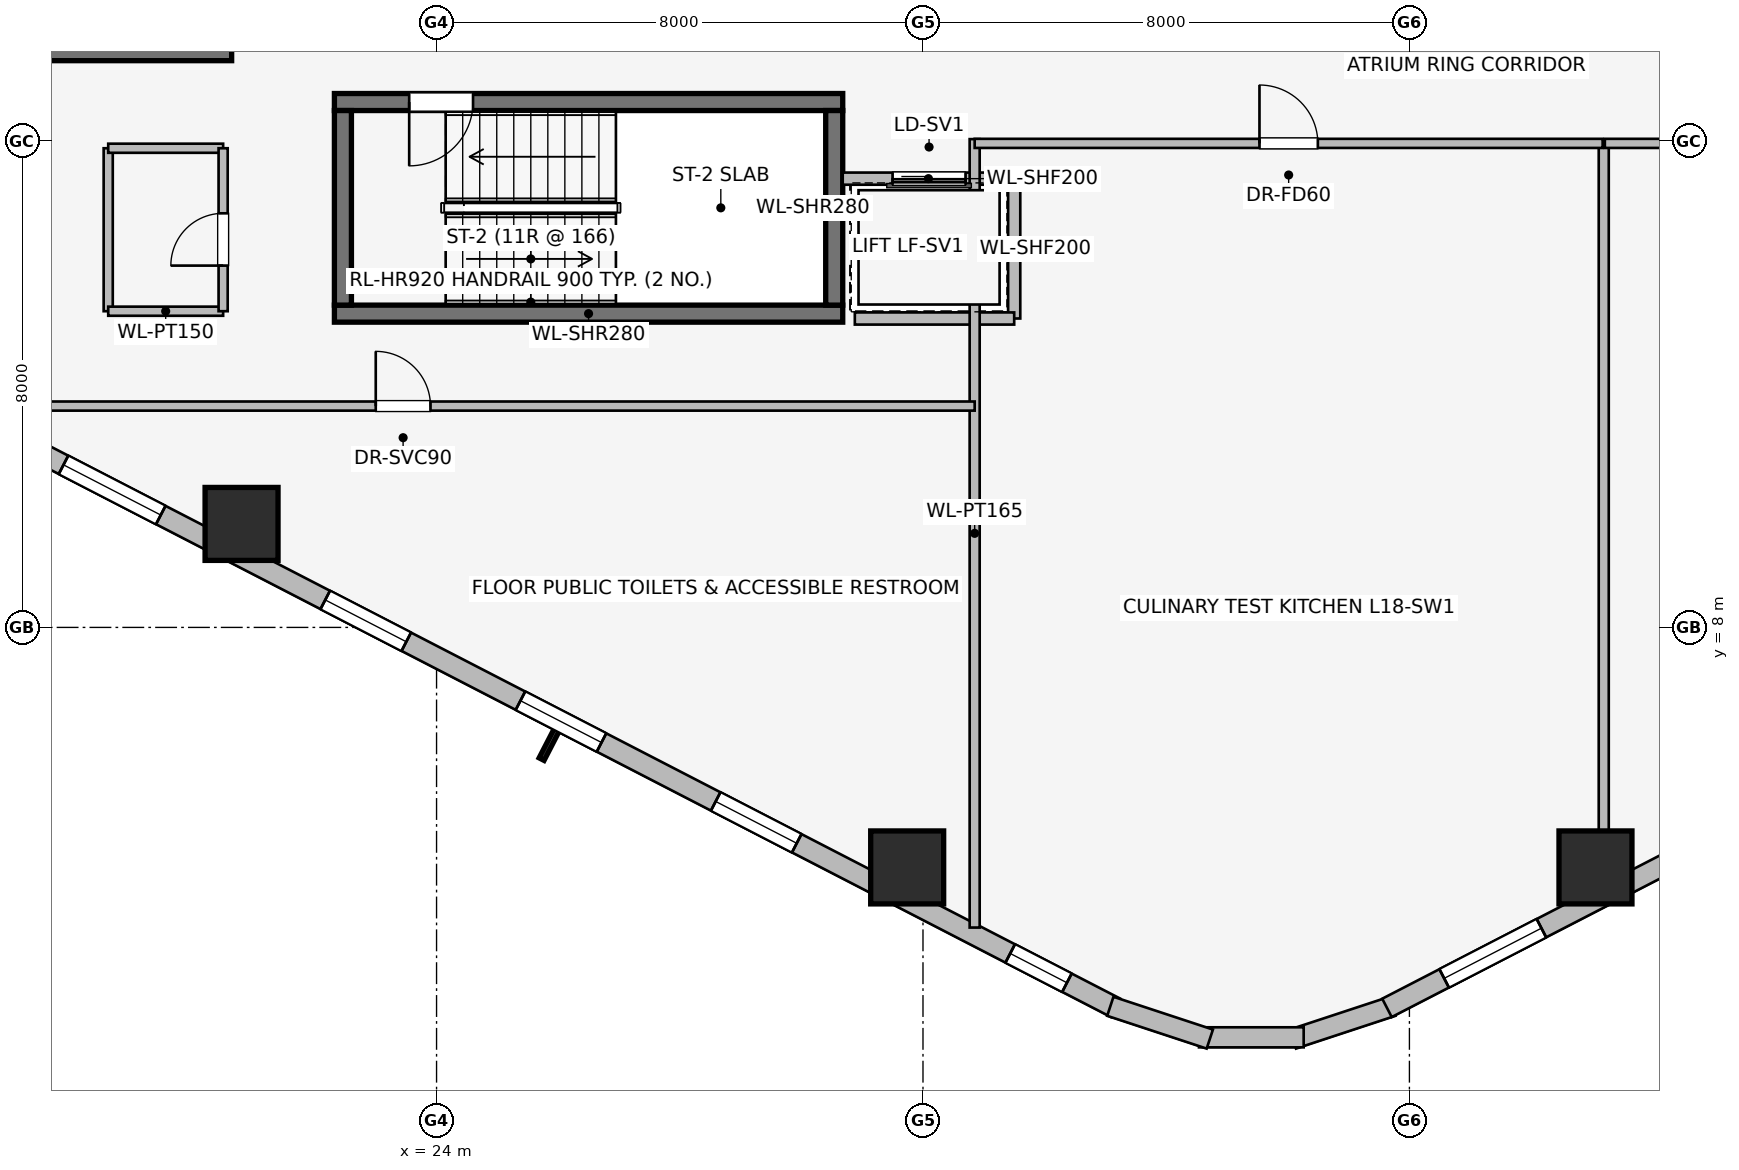
"""IFC4 building model, lengths in metres.
Left out: names, types, materials, properties, quantities, classifications, styles, units other than length and angle.
Written with IfcOpenShell. Run it as: python <this file> out.ifc"""

import sys

from ifc_helpers import new_model, si_unit, direction, frame, frame_2d, origin, origin_2d, place, context, subcontext, project, spatial, rectangle, extrude, element, fill, save


model = new_model("IFC4")
c1 = context("Model", 3, precision=1e-05, world=origin(), true_north=direction((0.0, 1.0)))
c2 = subcontext(c1, "Body", "Model", "MODEL_VIEW")
j1 = project(units=[si_unit("LENGTHUNIT", "METRE"), si_unit("PLANEANGLEUNIT", "RADIAN")], contexts=[c1])
p1 = place(None, origin())
s1 = spatial("IfcSite", under=j1, at=p1, CompositionType="ELEMENT")
p2 = place(p1, origin())
s2 = spatial("IfcBuilding", under=s1, at=p2, CompositionType="ELEMENT")
p3 = place(p2, frame((0.0, 0.0, 70.8)))
s3 = spatial("IfcBuildingStorey", under=s2, at=p3, CompositionType="ELEMENT", Elevation=70.8)
p4 = place(p3, frame((16.87, 17.46, 0.0), z_axis=(0.0, 0.0, 1.0), x_axis=(1.0, 0.0, 0.0)))
e1 = element("IfcWall", 1, at=p4, inside=s3, PredefinedType="SHEAR", context=c2, shape_type="SweptSolid", body=[
    extrude(rectangle(XDim=3.76, YDim=0.28, at=frame_2d((1.88, 0.0))), origin(), (0.0, 0.0, 1.0), 3.65),
])
p5 = place(p3, frame((22.32, 13.16, 0.0), z_axis=(0.0, 0.0, 1.0), x_axis=(1.0, 0.0, 0.0)))
e2 = element("IfcWall", 2, at=p5, inside=s3, PredefinedType="SHEAR", context=c2, shape_type="SweptSolid", body=[
    extrude(rectangle(XDim=8.36, YDim=0.28, at=frame_2d((4.18, 0.0))), origin(), (0.0, 0.0, 1.0), 3.65),
])
p6 = place(p3, frame((30.68, 16.64, 0.0), z_axis=(0.0, 0.0, 1.0), x_axis=(-1.0, 0.0, 0.0)))
e3 = element("IfcWall", 3, at=p6, inside=s3, PredefinedType="SHEAR", context=c2, shape_type="SweptSolid", body=[
    extrude(rectangle(XDim=8.36, YDim=0.28, at=frame_2d((4.18, 0.0))), origin(), (0.0, 0.0, 1.0), 3.65),
])
p7 = place(p6, frame((6.08, 0.0, 0.0)))
e4 = element("IfcOpeningElement", 4, at=p7, cuts=e3, PredefinedType="OPENING", context=c2, shape_type="SweptSolid", body=[
    extrude(rectangle(XDim=1.05, YDim=2.0, at=frame_2d((0.525, 1.0))), frame((0.0, 0.15, 0.0), z_axis=(0.0, -1.0, 0.0), x_axis=(1.0, 0.0, 0.0)), (0.0, 0.0, 1.0), 0.3),
])
for number, where, z_axis, x_axis in (
    (5, (22.46, 16.5, 0.0), (0.0, 0.0, 1.0), (0.0, -1.0, 0.0)),
    (6, (30.54, 13.3, 0.0), (0.0, 0.0, 1.0), (0.0, 1.0, 0.0)),
):
    element("IfcWall", number, at=place(p3, frame(where, z_axis=z_axis, x_axis=x_axis)), inside=s3, PredefinedType="SHEAR", context=c2, shape_type="SweptSolid", body=[
        extrude(rectangle(XDim=3.2, YDim=0.28, at=frame_2d((1.6, 0.0))), origin(), (0.0, 0.0, 1.0), 3.65),
    ])
for number, where, z_axis, x_axis in (
    (7, (20.793, 9.702, 0.0), (0.0, 0.0, 1.0), (1.0, 0.0, 0.0)),
    (8, (31.74, 4.053, 0.0), (0.0, 0.0, 1.0), (1.0, 0.0, 0.0)),
    (9, (43.06, 4.053, 0.0), (0.0, 0.0, 1.0), (1.0, 0.0, 0.0)),
):
    element("IfcColumn", number, at=place(p3, frame(where, z_axis=z_axis, x_axis=x_axis)), inside=s3, PredefinedType="COLUMN", context=c2, shape_type="SweptSolid", body=[
        extrude(rectangle(XDim=1.2, YDim=1.2, at=origin_2d()), origin(), (0.0, 0.0, 1.0), 3.65),
    ])
p8 = place(p3, frame((35.169, 1.743, 0.0), z_axis=(0.0, 0.0, 1.0), x_axis=(-0.888634413993, 0.458616264721, 0.0)))
e10 = element("IfcWall", 10, at=p8, inside=s3, PredefinedType="STANDARD", context=c2, shape_type="SweptSolid", body=[
    extrude(rectangle(XDim=20.531, YDim=0.34, at=frame_2d((10.266, 0.0))), origin(), (0.0, 0.0, 1.0), 2.684),
])
p9 = place(p8, frame((0.902, 0.0, 0.75)))
e11 = element("IfcOpeningElement", 11, at=p9, cuts=e10, PredefinedType="OPENING", context=c2, shape_type="SweptSolid", body=[
    extrude(rectangle(XDim=1.05, YDim=1.4, at=frame_2d((0.525, 0.7))), frame((0.0, 0.18, 0.0), z_axis=(0.0, -1.0, 0.0), x_axis=(1.0, 0.0, 0.0)), (0.0, 0.0, 1.0), 0.36),
])
p10 = place(p8, frame((5.903, 0.0, 0.75)))
e12 = element("IfcOpeningElement", 12, at=p10, cuts=e10, PredefinedType="OPENING", context=c2, shape_type="SweptSolid", body=[
    extrude(rectangle(XDim=1.5, YDim=1.5, at=frame_2d((0.75, 0.75))), frame((0.0, 0.18, 0.0), z_axis=(0.0, -1.0, 0.0), x_axis=(1.0, 0.0, 0.0)), (0.0, 0.0, 1.0), 0.36),
])
p11 = place(p8, frame((9.516, 0.0, 0.75)))
e13 = element("IfcOpeningElement", 13, at=p11, cuts=e10, PredefinedType="OPENING", context=c2, shape_type="SweptSolid", body=[
    extrude(rectangle(XDim=1.5, YDim=1.5, at=frame_2d((0.75, 0.75))), frame((0.0, 0.18, 0.0), z_axis=(0.0, -1.0, 0.0), x_axis=(1.0, 0.0, 0.0)), (0.0, 0.0, 1.0), 0.36),
])
p12 = place(p8, frame((13.129, 0.0, 0.75)))
e14 = element("IfcOpeningElement", 14, at=p12, cuts=e10, PredefinedType="OPENING", context=c2, shape_type="SweptSolid", body=[
    extrude(rectangle(XDim=1.5, YDim=1.5, at=frame_2d((0.75, 0.75))), frame((0.0, 0.18, 0.0), z_axis=(0.0, -1.0, 0.0), x_axis=(1.0, 0.0, 0.0)), (0.0, 0.0, 1.0), 0.36),
])
p13 = place(p8, frame((17.673, 0.0, 0.75)))
e15 = element("IfcOpeningElement", 15, at=p13, cuts=e10, PredefinedType="OPENING", context=c2, shape_type="SweptSolid", body=[
    extrude(rectangle(XDim=1.8, YDim=1.5, at=frame_2d((0.9, 0.75))), frame((0.0, 0.18, 0.0), z_axis=(0.0, -1.0, 0.0), x_axis=(1.0, 0.0, 0.0)), (0.0, 0.0, 1.0), 0.36),
])
p14 = place(p3, frame((39.719, 1.769, 0.0), z_axis=(0.0, 0.0, 1.0), x_axis=(-0.94976901097, -0.312951794691, 0.0)))
e16 = element("IfcWall", 16, at=p14, inside=s3, PredefinedType="STANDARD", context=c2, shape_type="SweptSolid", body=[
    extrude(rectangle(XDim=1.722, YDim=0.33, at=frame_2d((0.861, 0.0))), origin(), (0.0, 0.0, 1.0), 3.39),
])
p15 = place(p3, frame((38.261, 1.259, 0.0), z_axis=(0.0, 0.0, 1.0), x_axis=(-1.0, 0.0, 0.0)))
e17 = element("IfcWall", 17, at=p15, inside=s3, PredefinedType="STANDARD", context=c2, shape_type="SweptSolid", body=[
    extrude(rectangle(XDim=1.722, YDim=0.33, at=frame_2d((0.861, 0.0))), origin(), (0.0, 0.0, 1.0), 3.39),
])
p16 = place(p3, frame((36.717, 1.23, 0.0), z_axis=(0.0, 0.0, 1.0), x_axis=(-0.94976901097, 0.312951794691, 0.0)))
e18 = element("IfcWall", 18, at=p16, inside=s3, PredefinedType="STANDARD", context=c2, shape_type="SweptSolid", body=[
    extrude(rectangle(XDim=1.722, YDim=0.33, at=frame_2d((0.861, 0.0))), origin(), (0.0, 0.0, 1.0), 3.39),
])
p17 = place(p3, frame((57.876, 11.159, 0.0), z_axis=(0.0, 0.0, 1.0), x_axis=(-0.888634413993, -0.458616264721, 0.0)))
e19 = element("IfcWall", 19, at=p17, inside=s3, PredefinedType="STANDARD", context=c2, shape_type="SweptSolid", body=[
    extrude(rectangle(XDim=20.531, YDim=0.34, at=frame_2d((10.266, 0.0))), origin(), (0.0, 0.0, 1.0), 2.684),
])
p18 = place(p17, frame((1.058, 0.0, 0.75)))
e20 = element("IfcOpeningElement", 20, at=p18, cuts=e19, PredefinedType="OPENING", context=c2, shape_type="SweptSolid", body=[
    extrude(rectangle(XDim=1.8, YDim=1.5, at=frame_2d((0.9, 0.75))), frame((0.0, 0.18, 0.0), z_axis=(0.0, -1.0, 0.0), x_axis=(1.0, 0.0, 0.0)), (0.0, 0.0, 1.0), 0.36),
])
p19 = place(p17, frame((5.903, 0.0, 0.75)))
e21 = element("IfcOpeningElement", 21, at=p19, cuts=e19, PredefinedType="OPENING", context=c2, shape_type="SweptSolid", body=[
    extrude(rectangle(XDim=1.5, YDim=1.5, at=frame_2d((0.75, 0.75))), frame((0.0, 0.18, 0.0), z_axis=(0.0, -1.0, 0.0), x_axis=(1.0, 0.0, 0.0)), (0.0, 0.0, 1.0), 0.36),
])
p20 = place(p17, frame((9.516, 0.0, 0.75)))
e22 = element("IfcOpeningElement", 22, at=p20, cuts=e19, PredefinedType="OPENING", context=c2, shape_type="SweptSolid", body=[
    extrude(rectangle(XDim=1.5, YDim=1.5, at=frame_2d((0.75, 0.75))), frame((0.0, 0.18, 0.0), z_axis=(0.0, -1.0, 0.0), x_axis=(1.0, 0.0, 0.0)), (0.0, 0.0, 1.0), 0.36),
])
p21 = place(p17, frame((13.129, 0.0, 0.75)))
e23 = element("IfcOpeningElement", 23, at=p21, cuts=e19, PredefinedType="OPENING", context=c2, shape_type="SweptSolid", body=[
    extrude(rectangle(XDim=1.5, YDim=1.5, at=frame_2d((0.75, 0.75))), frame((0.0, 0.18, 0.0), z_axis=(0.0, -1.0, 0.0), x_axis=(1.0, 0.0, 0.0)), (0.0, 0.0, 1.0), 0.36),
])
p22 = place(p17, frame((17.673, 0.0, 0.75)))
e24 = element("IfcOpeningElement", 24, at=p22, cuts=e19, PredefinedType="OPENING", context=c2, shape_type="SweptSolid", body=[
    extrude(rectangle(XDim=1.8, YDim=1.5, at=frame_2d((0.9, 0.75))), frame((0.0, 0.18, 0.0), z_axis=(0.0, -1.0, 0.0), x_axis=(1.0, 0.0, 0.0)), (0.0, 0.0, 1.0), 0.36),
])
p23 = place(p3, frame((33.5, 15.38, 0.0), z_axis=(0.0, 0.0, 1.0), x_axis=(-1.0, 0.0, 0.0)))
e25 = element("IfcWall", 25, at=p23, inside=s3, PredefinedType="PARTITIONING", context=c2, shape_type="SweptSolid", body=[
    extrude(rectangle(XDim=2.82, YDim=0.2, at=frame_2d((1.41, 0.0))), origin(), (0.0, 0.0, 1.0), 3.39),
])
p24 = place(p23, frame((0.8, 0.0, 0.0)))
e26 = element("IfcOpeningElement", 26, at=p24, cuts=e25, PredefinedType="OPENING", context=c2, shape_type="SweptSolid", body=[
    extrude(rectangle(XDim=1.2, YDim=2.2, at=frame_2d((0.6, 1.1))), frame((0.0, 0.11, 0.0), z_axis=(0.0, -1.0, 0.0), x_axis=(1.0, 0.0, 0.0)), (0.0, 0.0, 1.0), 0.22),
])
p25 = place(p3, frame((33.5, 13.08, 0.0), z_axis=(0.0, 0.0, 1.0), x_axis=(0.0, 1.0, 0.0)))
e27 = element("IfcWall", 27, at=p25, inside=s3, PredefinedType="PARTITIONING", context=c2, shape_type="SweptSolid", body=[
    extrude(rectangle(XDim=2.3, YDim=0.2, at=frame_2d((1.15, 0.0))), origin(), (0.0, 0.0, 1.0), 3.39),
])
p26 = place(p3, frame((30.879, 13.08, 0.0), z_axis=(0.0, 0.0, 1.0), x_axis=(1.0, 0.0, 0.0)))
e28 = element("IfcWall", 28, at=p26, inside=s3, PredefinedType="PARTITIONING", context=c2, shape_type="SweptSolid", body=[
    extrude(rectangle(XDim=2.621, YDim=0.2, at=frame_2d((1.311, 0.0))), origin(), (0.0, 0.0, 1.0), 3.39),
])
p27 = place(p3, frame((18.6, 15.88, 0.0), z_axis=(0.0, 0.0, 1.0), x_axis=(0.0, -1.0, 0.0)))
e29 = element("IfcWall", 29, at=p27, inside=s3, PredefinedType="PARTITIONING", context=c2, shape_type="SweptSolid", body=[
    extrude(rectangle(XDim=2.68, YDim=0.15, at=frame_2d((1.34, 0.0))), origin(), (0.0, 0.0, 1.0), 3.39),
])
for number, where, z_axis, x_axis in (
    (30, (18.6, 13.2, 0.0), (0.0, 0.0, 1.0), (1.0, 0.0, 0.0)),
    (31, (18.6, 15.88, 0.0), (0.0, 0.0, 1.0), (1.0, 0.0, 0.0)),
):
    element("IfcWall", number, at=place(p3, frame(where, z_axis=z_axis, x_axis=x_axis)), inside=s3, PredefinedType="PARTITIONING", context=c2, shape_type="SweptSolid", body=[
        extrude(rectangle(XDim=1.89, YDim=0.15, at=frame_2d((0.945, 0.0))), origin(), (0.0, 0.0, 1.0), 3.39),
    ])
p28 = place(p3, frame((20.49, 13.2, 0.0), z_axis=(0.0, 0.0, 1.0), x_axis=(0.0, 1.0, 0.0)))
e32 = element("IfcWall", 32, at=p28, inside=s3, PredefinedType="PARTITIONING", context=c2, shape_type="SweptSolid", body=[
    extrude(rectangle(XDim=2.68, YDim=0.15, at=frame_2d((1.34, 0.0))), origin(), (0.0, 0.0, 1.0), 3.39),
])
p29 = place(p28, frame((0.75, 0.0, 0.0)))
e33 = element("IfcOpeningElement", 33, at=p29, cuts=e32, PredefinedType="OPENING", context=c2, shape_type="SweptSolid", body=[
    extrude(rectangle(XDim=0.86, YDim=2.0, at=frame_2d((0.43, 1.0))), frame((0.0, 0.085, 0.0), z_axis=(0.0, -1.0, 0.0), x_axis=(1.0, 0.0, 0.0)), (0.0, 0.0, 1.0), 0.17),
])
p30 = place(p3, frame((32.85, 3.064, 0.0), z_axis=(0.0, 0.0, 1.0), x_axis=(0.0, 1.0, 0.0)))
e34 = element("IfcWall", 34, at=p30, inside=s3, PredefinedType="PARTITIONING", context=c2, shape_type="SweptSolid", body=[
    extrude(rectangle(XDim=12.966, YDim=0.165, at=frame_2d((6.483, 0.0))), origin(), (0.0, 0.0, 1.0), 3.39),
])
p31 = place(p3, frame((16.487, 11.64, 0.0), z_axis=(0.0, 0.0, 1.0), x_axis=(1.0, 0.0, 0.0)))
e35 = element("IfcWall", 35, at=p31, inside=s3, PredefinedType="PARTITIONING", context=c2, shape_type="SweptSolid", body=[
    extrude(rectangle(XDim=16.363, YDim=0.15, at=frame_2d((8.182, 0.0))), origin(), (0.0, 0.0, 1.0), 3.39),
])
p32 = place(p31, frame((6.513, 0.0, 0.0)))
e36 = element("IfcOpeningElement", 36, at=p32, cuts=e35, PredefinedType="OPENING", context=c2, shape_type="SweptSolid", body=[
    extrude(rectangle(XDim=0.9, YDim=2.0, at=frame_2d((0.45, 1.0))), frame((0.0, 0.085, 0.0), z_axis=(0.0, -1.0, 0.0), x_axis=(1.0, 0.0, 0.0)), (0.0, 0.0, 1.0), 0.17),
])
p33 = place(p3, frame((43.196, 3.718, 0.0), z_axis=(0.0, 0.0, 1.0), x_axis=(0.0, 1.0, 0.0)))
e37 = element("IfcWall", 37, at=p33, inside=s3, PredefinedType="PARTITIONING", context=c2, shape_type="SweptSolid", body=[
    extrude(rectangle(XDim=12.212, YDim=0.165, at=frame_2d((6.106, 0.0))), origin(), (0.0, 0.0, 1.0), 2.513),
])
p34 = place(p3, frame((32.85, 15.96, 0.0), z_axis=(0.0, 0.0, 1.0), x_axis=(1.0, 0.0, 0.0)))
e38 = element("IfcWall", 38, at=p34, inside=s3, PredefinedType="PARTITIONING", context=c2, shape_type="SweptSolid", body=[
    extrude(rectangle(XDim=10.328, YDim=0.15, at=frame_2d((5.164, 0.0))), origin(), (0.0, 0.0, 1.0), 3.39),
])
p35 = place(p34, frame((4.684, 0.0, 0.0)))
e39 = element("IfcOpeningElement", 39, at=p35, cuts=e38, PredefinedType="OPENING", context=c2, shape_type="SweptSolid", body=[
    extrude(rectangle(XDim=0.96, YDim=2.0, at=frame_2d((0.48, 1.0))), frame((0.0, 0.085, 0.0), z_axis=(0.0, -1.0, 0.0), x_axis=(1.0, 0.0, 0.0)), (0.0, 0.0, 1.0), 0.17),
])
p36 = place(p3, frame((43.214, 15.96, 0.0), z_axis=(0.0, 0.0, 1.0), x_axis=(1.0, 0.0, 0.0)))
e40 = element("IfcWall", 40, at=p36, inside=s3, PredefinedType="PARTITIONING", context=c2, shape_type="SweptSolid", body=[
    extrude(rectangle(XDim=17.039, YDim=0.15, at=frame_2d((8.52, 0.0))), origin(), (0.0, 0.0, 1.0), 3.39),
])
p37 = place(p36, frame((8.053, 0.0, 0.0)))
e41 = element("IfcOpeningElement", 41, at=p37, cuts=e40, PredefinedType="OPENING", context=c2, shape_type="SweptSolid", body=[
    extrude(rectangle(XDim=0.96, YDim=2.0, at=frame_2d((0.48, 1.0))), frame((0.0, 0.085, 0.0), z_axis=(0.0, -1.0, 0.0), x_axis=(1.0, 0.0, 0.0)), (0.0, 0.0, 1.0), 0.17),
])
p38 = place(p9, origin())
e42 = element("IfcWindow", 42, at=p38, inside=s3, PartitioningType="SINGLE_PANEL", PredefinedType="WINDOW", context=c2, shape_type="SweptSolid", body=[
    extrude(rectangle(XDim=1.05, YDim=1.4, at=frame_2d((0.525, 0.7))), frame((0.0, 0.03, 0.0), z_axis=(0.0, -1.0, 0.0), x_axis=(1.0, 0.0, 0.0)), (0.0, 0.0, 1.0), 0.06),
])
fill(e11, e42)
p39 = place(p10, origin())
e43 = element("IfcWindow", 43, at=p39, inside=s3, PartitioningType="SINGLE_PANEL", PredefinedType="WINDOW", context=c2, shape_type="SweptSolid", body=[
    extrude(rectangle(XDim=1.5, YDim=1.5, at=frame_2d((0.75, 0.75))), frame((0.0, 0.03, 0.0), z_axis=(0.0, -1.0, 0.0), x_axis=(1.0, 0.0, 0.0)), (0.0, 0.0, 1.0), 0.06),
])
fill(e12, e43)
p40 = place(p11, origin())
e44 = element("IfcWindow", 44, at=p40, inside=s3, PartitioningType="SINGLE_PANEL", PredefinedType="WINDOW", context=c2, shape_type="SweptSolid", body=[
    extrude(rectangle(XDim=1.5, YDim=1.5, at=frame_2d((0.75, 0.75))), frame((0.0, 0.03, 0.0), z_axis=(0.0, -1.0, 0.0), x_axis=(1.0, 0.0, 0.0)), (0.0, 0.0, 1.0), 0.06),
])
fill(e13, e44)
p41 = place(p12, origin())
e45 = element("IfcWindow", 45, at=p41, inside=s3, PartitioningType="SINGLE_PANEL", PredefinedType="WINDOW", context=c2, shape_type="SweptSolid", body=[
    extrude(rectangle(XDim=1.5, YDim=1.5, at=frame_2d((0.75, 0.75))), frame((0.0, 0.03, 0.0), z_axis=(0.0, -1.0, 0.0), x_axis=(1.0, 0.0, 0.0)), (0.0, 0.0, 1.0), 0.06),
])
fill(e14, e45)
p42 = place(p13, origin())
e46 = element("IfcWindow", 46, at=p42, inside=s3, PartitioningType="SINGLE_PANEL", PredefinedType="WINDOW", context=c2, shape_type="SweptSolid", body=[
    extrude(rectangle(XDim=1.8, YDim=1.5, at=frame_2d((0.9, 0.75))), frame((0.0, 0.03, 0.0), z_axis=(0.0, -1.0, 0.0), x_axis=(1.0, 0.0, 0.0)), (0.0, 0.0, 1.0), 0.06),
])
fill(e15, e46)
p43 = place(p22, origin())
e47 = element("IfcWindow", 47, at=p43, inside=s3, PartitioningType="SINGLE_PANEL", PredefinedType="WINDOW", context=c2, shape_type="SweptSolid", body=[
    extrude(rectangle(XDim=1.8, YDim=1.5, at=frame_2d((0.9, 0.75))), frame((0.0, 0.03, 0.0), z_axis=(0.0, -1.0, 0.0), x_axis=(1.0, 0.0, 0.0)), (0.0, 0.0, 1.0), 0.06),
])
fill(e24, e47)
p44 = place(p7, origin())
e48 = element("IfcDoor", 48, at=p44, inside=s3, OperationType="SINGLE_SWING_RIGHT", PredefinedType="DOOR", context=c2, shape_type="SweptSolid", body=[
    extrude(rectangle(XDim=1.05, YDim=2.0, at=frame_2d((0.525, 1.0))), frame((0.0, 0.025, 0.0), z_axis=(0.0, -1.0, 0.0), x_axis=(1.0, 0.0, 0.0)), (0.0, 0.0, 1.0), 0.05),
])
fill(e4, e48)
p45 = place(p24, origin())
e49 = element("IfcDoor", 49, at=p45, inside=s3, OperationType="SLIDING_TO_RIGHT", PredefinedType="DOOR", context=c2, shape_type="SweptSolid", body=[
    extrude(rectangle(XDim=1.2, YDim=2.2, at=frame_2d((0.6, 1.1))), frame((0.0, 0.025, 0.0), z_axis=(0.0, -1.0, 0.0), x_axis=(1.0, 0.0, 0.0)), (0.0, 0.0, 1.0), 0.05),
])
fill(e26, e49)
p46 = place(p29, origin())
e50 = element("IfcDoor", 50, at=p46, inside=s3, OperationType="SINGLE_SWING_LEFT", PredefinedType="DOOR", context=c2, shape_type="SweptSolid", body=[
    extrude(rectangle(XDim=0.86, YDim=2.0, at=frame_2d((0.43, 1.0))), frame((0.0, 0.025, 0.0), z_axis=(0.0, -1.0, 0.0), x_axis=(1.0, 0.0, 0.0)), (0.0, 0.0, 1.0), 0.05),
])
fill(e33, e50)
p47 = place(p32, origin())
e51 = element("IfcDoor", 51, at=p47, inside=s3, OperationType="SINGLE_SWING_LEFT", PredefinedType="DOOR", context=c2, shape_type="SweptSolid", body=[
    extrude(rectangle(XDim=0.9, YDim=2.0, at=frame_2d((0.45, 1.0))), frame((0.0, 0.025, 0.0), z_axis=(0.0, -1.0, 0.0), x_axis=(1.0, 0.0, 0.0)), (0.0, 0.0, 1.0), 0.05),
])
fill(e36, e51)
p48 = place(p35, origin())
e52 = element("IfcDoor", 52, at=p48, inside=s3, OperationType="SINGLE_SWING_LEFT", PredefinedType="DOOR", context=c2, shape_type="SweptSolid", body=[
    extrude(rectangle(XDim=0.96, YDim=2.0, at=frame_2d((0.48, 1.0))), frame((0.0, 0.025, 0.0), z_axis=(0.0, -1.0, 0.0), x_axis=(1.0, 0.0, 0.0)), (0.0, 0.0, 1.0), 0.05),
])
fill(e39, e52)
save(model, sys.argv[1])
